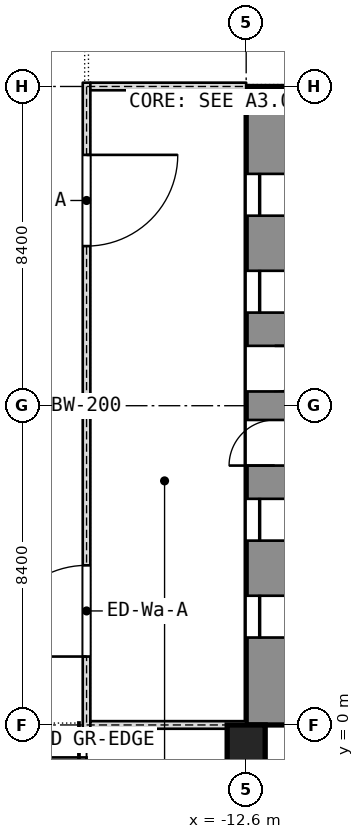
"""IFC4 building model, lengths in metres.
Left out: names, types, materials, properties, quantities, classifications, styles, units other than length and angle.
Written with IfcOpenShell. Run it as: python <this file> out.ifc"""

import sys

from ifc_helpers import new_model, si_unit, direction, frame, frame_2d, origin, origin_2d, place, context, subcontext, project, spatial, rectangle, extrude, element, fill, save


model = new_model("IFC4")
c1 = context("Model", 3, precision=1e-05, world=origin(), true_north=direction((0.0, 1.0)))
c2 = subcontext(c1, "Body", "Model", "MODEL_VIEW")
j1 = project(units=[si_unit("LENGTHUNIT", "METRE"), si_unit("PLANEANGLEUNIT", "RADIAN")], contexts=[c1])
p1 = place(None, origin())
s1 = spatial("IfcSite", under=j1, at=p1, CompositionType="ELEMENT")
p2 = place(p1, origin())
s2 = spatial("IfcBuilding", under=s1, at=p2, CompositionType="ELEMENT")
p3 = place(p2, frame((0.0, 0.0, 8.0)))
s3 = spatial("IfcBuildingStorey", under=s2, at=p3, CompositionType="ELEMENT", Elevation=8.0)
p4 = place(p3, frame((-11.85, 0.0, 0.0), z_axis=(0.0, 0.0, 1.0), x_axis=(0.0, 1.0, 0.0)))
e1 = element("IfcWall", 1, at=p4, inside=s3, PredefinedType="SHEAR", context=c2, shape_type="SweptSolid", body=[
    extrude(rectangle(XDim=16.8, YDim=1.5, at=frame_2d((8.4, 0.0))), origin(), (0.0, 0.0, 1.0), 5.0),
])
p5 = place(p4, frame((2.3, 0.0, 0.0)))
e2 = element("IfcOpeningElement", 2, at=p5, cuts=e1, PredefinedType="OPENING", context=c2, shape_type="SweptSolid", body=[
    extrude(rectangle(XDim=1.1, YDim=2.1, at=frame_2d((0.55, 1.05))), frame((0.0, 0.75, 0.0), z_axis=(0.0, -1.0, 0.0), x_axis=(1.0, 0.0, 0.0)), (0.0, 0.0, 1.0), 1.5),
])
p6 = place(p4, frame((4.85, 0.0, 0.0)))
e3 = element("IfcOpeningElement", 3, at=p6, cuts=e1, PredefinedType="OPENING", context=c2, shape_type="SweptSolid", body=[
    extrude(rectangle(XDim=1.1, YDim=2.1, at=frame_2d((0.55, 1.05))), frame((0.0, 0.75, 0.0), z_axis=(0.0, -1.0, 0.0), x_axis=(1.0, 0.0, 0.0)), (0.0, 0.0, 1.0), 1.5),
])
p7 = place(p4, frame((6.825, 0.0, 0.0)))
e4 = element("IfcOpeningElement", 4, at=p7, cuts=e1, PredefinedType="OPENING", context=c2, shape_type="SweptSolid", body=[
    extrude(rectangle(XDim=1.2, YDim=2.1, at=frame_2d((0.6, 1.05))), frame((0.0, 0.75, 0.0), z_axis=(0.0, -1.0, 0.0), x_axis=(1.0, 0.0, 0.0)), (0.0, 0.0, 1.0), 1.5),
])
p8 = place(p4, frame((13.4, 0.0, 0.0)))
e5 = element("IfcOpeningElement", 5, at=p8, cuts=e1, PredefinedType="OPENING", context=c2, shape_type="SweptSolid", body=[
    extrude(rectangle(XDim=1.1, YDim=2.1, at=frame_2d((0.55, 1.05))), frame((0.0, 0.75, 0.0), z_axis=(0.0, -1.0, 0.0), x_axis=(1.0, 0.0, 0.0)), (0.0, 0.0, 1.0), 1.5),
])
p9 = place(p4, frame((10.85, 0.0, 0.0)))
e6 = element("IfcOpeningElement", 6, at=p9, cuts=e1, PredefinedType="OPENING", context=c2, shape_type="SweptSolid", body=[
    extrude(rectangle(XDim=1.1, YDim=2.1, at=frame_2d((0.55, 1.05))), frame((0.0, 0.75, 0.0), z_axis=(0.0, -1.0, 0.0), x_axis=(1.0, 0.0, 0.0)), (0.0, 0.0, 1.0), 1.5),
])
p10 = place(p4, frame((8.775, 0.0, 0.0)))
e7 = element("IfcOpeningElement", 7, at=p10, cuts=e1, PredefinedType="OPENING", context=c2, shape_type="SweptSolid", body=[
    extrude(rectangle(XDim=1.2, YDim=2.1, at=frame_2d((0.6, 1.05))), frame((0.0, 0.75, 0.0), z_axis=(0.0, -1.0, 0.0), x_axis=(1.0, 0.0, 0.0)), (0.0, 0.0, 1.0), 1.5),
])
p11 = place(p3, frame((-12.6, -0.5, 0.0), z_axis=(0.0, 0.0, 1.0), x_axis=(1.0, 0.0, 0.0)))
e8 = element("IfcColumn", 8, at=p11, inside=s3, PredefinedType="COLUMN", context=c2, shape_type="SweptSolid", body=[
    extrude(rectangle(XDim=1.0, YDim=1.0, at=origin_2d()), origin(), (0.0, 0.0, 1.0), 5.0),
])
p12 = place(p3, frame((-16.8, -0.1, 0.0), z_axis=(0.0, 0.0, 1.0), x_axis=(0.0, 1.0, 0.0)))
e9 = element("IfcWall", 9, at=p12, inside=s3, PredefinedType="PARTITIONING", context=c2, shape_type="SweptSolid", body=[
    extrude(rectangle(XDim=17.0, YDim=0.2, at=frame_2d((8.5, 0.0))), origin(), (0.0, 0.0, 1.0), 4.78),
])
p13 = place(p12, frame((1.9, 0.0, 0.0)))
e10 = element("IfcOpeningElement", 10, at=p13, cuts=e9, PredefinedType="OPENING", context=c2, shape_type="SweptSolid", body=[
    extrude(rectangle(XDim=2.4, YDim=2.1, at=frame_2d((1.2, 1.05))), frame((0.0, 0.1, 0.0), z_axis=(0.0, -1.0, 0.0), x_axis=(1.0, 0.0, 0.0)), (0.0, 0.0, 1.0), 0.2),
])
p14 = place(p12, frame((12.7, 0.0, 0.0)))
e11 = element("IfcOpeningElement", 11, at=p14, cuts=e9, PredefinedType="OPENING", context=c2, shape_type="SweptSolid", body=[
    extrude(rectangle(XDim=2.4, YDim=2.1, at=frame_2d((1.2, 1.05))), frame((0.0, 0.1, 0.0), z_axis=(0.0, -1.0, 0.0), x_axis=(1.0, 0.0, 0.0)), (0.0, 0.0, 1.0), 0.2),
])
for number, where, z_axis, x_axis in (
    (12, (-16.7, 0.0, 0.0), (0.0, 0.0, 1.0), (1.0, 0.0, 0.0)),
    (13, (-16.7, 16.8, 0.0), (0.0, 0.0, 1.0), (1.0, 0.0, 0.0)),
):
    element("IfcWall", number, at=place(p3, frame(where, z_axis=z_axis, x_axis=x_axis)), inside=s3, PredefinedType="PARTITIONING", context=c2, shape_type="SweptSolid", body=[
        extrude(rectangle(XDim=4.1, YDim=0.2, at=frame_2d((2.05, 0.0))), origin(), (0.0, 0.0, 1.0), 4.78),
    ])
p15 = place(p5, origin())
e14 = element("IfcDoor", 14, at=p15, inside=s3, OperationType="SLIDING_TO_LEFT", PredefinedType="DOOR", context=c2, shape_type="SweptSolid", body=[
    extrude(rectangle(XDim=1.1, YDim=2.1, at=frame_2d((0.55, 1.05))), frame((0.0, 0.025, 0.0), z_axis=(0.0, -1.0, 0.0), x_axis=(1.0, 0.0, 0.0)), (0.0, 0.0, 1.0), 0.05),
])
fill(e2, e14)
p16 = place(p6, origin())
e15 = element("IfcDoor", 15, at=p16, inside=s3, OperationType="SLIDING_TO_LEFT", PredefinedType="DOOR", context=c2, shape_type="SweptSolid", body=[
    extrude(rectangle(XDim=1.1, YDim=2.1, at=frame_2d((0.55, 1.05))), frame((0.0, 0.025, 0.0), z_axis=(0.0, -1.0, 0.0), x_axis=(1.0, 0.0, 0.0)), (0.0, 0.0, 1.0), 0.05),
])
fill(e3, e15)
p17 = place(p7, origin())
e16 = element("IfcDoor", 16, at=p17, inside=s3, OperationType="SINGLE_SWING_LEFT", PredefinedType="DOOR", context=c2, shape_type="SweptSolid", body=[
    extrude(rectangle(XDim=1.2, YDim=2.1, at=frame_2d((0.6, 1.05))), frame((0.0, 0.025, 0.0), z_axis=(0.0, -1.0, 0.0), x_axis=(1.0, 0.0, 0.0)), (0.0, 0.0, 1.0), 0.05),
])
fill(e4, e16)
p18 = place(p8, origin())
e17 = element("IfcDoor", 17, at=p18, inside=s3, OperationType="SLIDING_TO_LEFT", PredefinedType="DOOR", context=c2, shape_type="SweptSolid", body=[
    extrude(rectangle(XDim=1.1, YDim=2.1, at=frame_2d((0.55, 1.05))), frame((0.0, 0.025, 0.0), z_axis=(0.0, -1.0, 0.0), x_axis=(1.0, 0.0, 0.0)), (0.0, 0.0, 1.0), 0.05),
])
fill(e5, e17)
p19 = place(p9, origin())
e18 = element("IfcDoor", 18, at=p19, inside=s3, OperationType="SLIDING_TO_LEFT", PredefinedType="DOOR", context=c2, shape_type="SweptSolid", body=[
    extrude(rectangle(XDim=1.1, YDim=2.1, at=frame_2d((0.55, 1.05))), frame((0.0, 0.025, 0.0), z_axis=(0.0, -1.0, 0.0), x_axis=(1.0, 0.0, 0.0)), (0.0, 0.0, 1.0), 0.05),
])
fill(e6, e18)
p20 = place(p10, origin())
e19 = element("IfcDoor", 19, at=p20, inside=s3, OperationType="SINGLE_SWING_LEFT", PredefinedType="DOOR", context=c2, shape_type="SweptSolid", body=[
    extrude(rectangle(XDim=1.2, YDim=2.1, at=frame_2d((0.6, 1.05))), frame((0.0, 0.025, 0.0), z_axis=(0.0, -1.0, 0.0), x_axis=(1.0, 0.0, 0.0)), (0.0, 0.0, 1.0), 0.05),
])
fill(e7, e19)
p21 = place(p13, origin())
e20 = element("IfcDoor", 20, at=p21, inside=s3, OperationType="DOUBLE_DOOR_SINGLE_SWING", PredefinedType="DOOR", context=c2, shape_type="SweptSolid", body=[
    extrude(rectangle(XDim=2.4, YDim=2.1, at=frame_2d((1.2, 1.05))), frame((0.0, 0.025, 0.0), z_axis=(0.0, -1.0, 0.0), x_axis=(1.0, 0.0, 0.0)), (0.0, 0.0, 1.0), 0.05),
])
fill(e10, e20)
p22 = place(p14, origin())
e21 = element("IfcDoor", 21, at=p22, inside=s3, OperationType="DOUBLE_DOOR_SINGLE_SWING", PredefinedType="DOOR", context=c2, shape_type="SweptSolid", body=[
    extrude(rectangle(XDim=2.4, YDim=2.1, at=frame_2d((1.2, 1.05))), frame((0.0, 0.025, 0.0), z_axis=(0.0, -1.0, 0.0), x_axis=(1.0, 0.0, 0.0)), (0.0, 0.0, 1.0), 0.05),
])
fill(e11, e21)
save(model, sys.argv[1])
